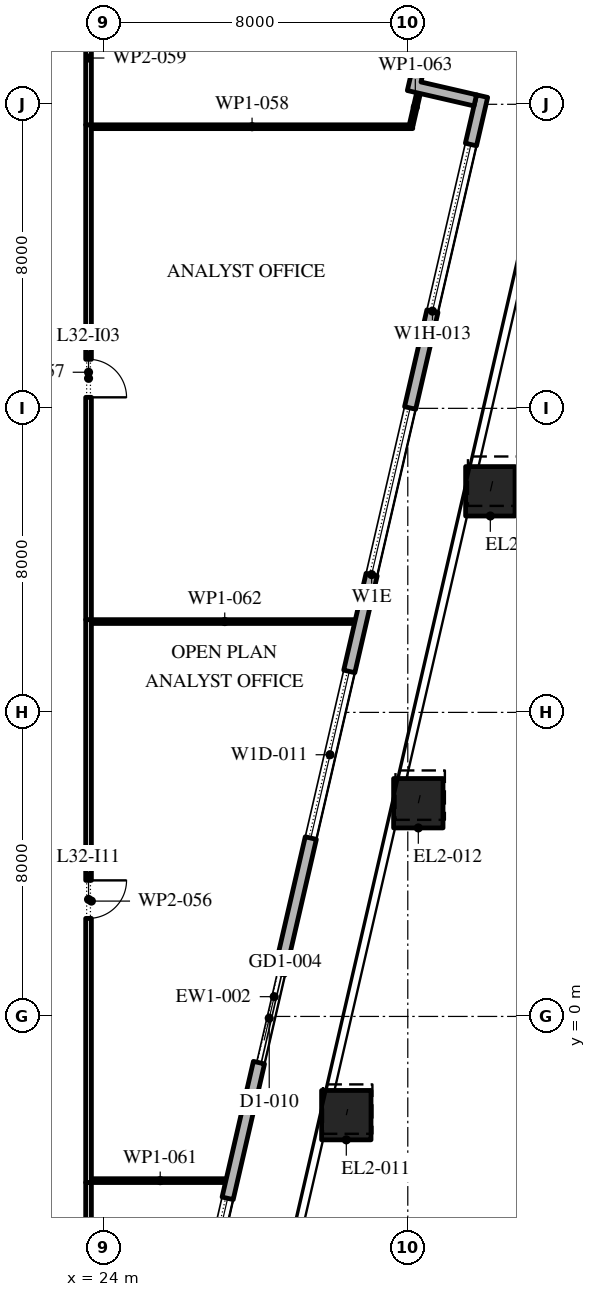
"""IFC4 building model, lengths in metres.
Left out: names, types, materials, properties, quantities, classifications, styles, units other than length and angle.
Written with IfcOpenShell. Run it as: python <this file> out.ifc"""

import sys

from ifc_helpers import new_model, si_unit, direction, frame, frame_2d, origin, origin_2d, place, context, subcontext, project, spatial, polyline, rectangle, outline, extrude, element, fill, save


model = new_model("IFC4")
c1 = context("Model", 3, precision=1e-05, world=origin(), true_north=direction((0.0, 1.0)))
c2 = subcontext(c1, "Body", "Model", "MODEL_VIEW")
j1 = project(units=[si_unit("LENGTHUNIT", "METRE"), si_unit("PLANEANGLEUNIT", "RADIAN")], contexts=[c1])
p1 = place(None, origin())
s1 = spatial("IfcSite", under=j1, at=p1, CompositionType="ELEMENT")
p2 = place(p1, origin())
s2 = spatial("IfcBuilding", under=s1, at=p2, CompositionType="ELEMENT")
p3 = place(p2, frame((0.0, 0.0, 147.6)))
s3 = spatial("IfcBuildingStorey", under=s2, at=p3, CompositionType="ELEMENT", Elevation=147.6)
p4 = place(p3, frame((30.382, -2.597, 0.0), z_axis=(0.008770884695, 0.037929719907, 0.99924191662), x_axis=(-0.974290512438, 0.225295355862, 0.0)))
e1 = element("IfcColumn", 1, at=p4, inside=s3, PredefinedType="COLUMN", context=c2, shape_type="SweptSolid", body=[
    extrude(rectangle(XDim=1.3, YDim=1.3, at=origin_2d()), origin(), (0.0, 0.0, 1.0), 4.203),
])
p5 = place(p3, frame((32.277, 5.61, 0.0), z_axis=(0.011668267153, 0.050562490995, 0.998652735462), x_axis=(-0.974391195695, 0.224859506699, 0.0)))
e2 = element("IfcColumn", 2, at=p5, inside=s3, PredefinedType="COLUMN", context=c2, shape_type="SweptSolid", body=[
    extrude(rectangle(XDim=1.3, YDim=1.3, at=origin_2d()), origin(), (0.0, 0.0, 1.0), 4.206),
])
p6 = place(p3, frame((34.172, 13.817, 0.0), z_axis=(0.014559788571, 0.063169759976, 0.997896584813), x_axis=(-0.97445148511, 0.224598092528, 0.0)))
e3 = element("IfcColumn", 3, at=p6, inside=s3, PredefinedType="COLUMN", context=c2, shape_type="SweptSolid", body=[
    extrude(rectangle(XDim=1.3, YDim=1.3, at=origin_2d()), origin(), (0.0, 0.0, 1.0), 4.209),
])
p7 = place(p3, origin())
e4 = element("IfcWall", 4, at=p7, inside=s3, PredefinedType="STANDARD", context=c2, shape_type="SweptSolid", body=[
    extrude(outline(polyline([(32.393, 26.116), (30.639, 26.521), (31.111, 28.567), (31.404, 28.5), (30.999, 26.746), (32.753, 26.341), (32.348, 24.587), (33.809, 24.25), (33.742, 23.957), (31.988, 24.362), (32.393, 26.116)])), origin(), (0.0, 0.0, 1.0), 4.0),
])
p8 = place(p3, frame((23.6, -4.37, 0.0), z_axis=(0.0, 0.0, 1.0), x_axis=(0.0, -1.0, 0.0)))
e5 = element("IfcWall", 5, at=p8, inside=s3, PredefinedType="PARTITIONING", context=c2, shape_type="SweptSolid", body=[
    extrude(rectangle(XDim=2.855, YDim=0.15, at=frame_2d((1.427, 0.0))), origin(), (0.0, 0.0, 1.0), 4.0),
])
p9 = place(p3, frame((23.6, 10.44, 0.0), z_axis=(0.0, 0.0, 1.0), x_axis=(0.0, -1.0, 0.0)))
e6 = element("IfcWall", 6, at=p9, inside=s3, PredefinedType="PARTITIONING", context=c2, shape_type="SweptSolid", body=[
    extrude(rectangle(XDim=14.81, YDim=0.15, at=frame_2d((7.405, 0.0))), origin(), (0.0, 0.0, 1.0), 4.0),
])
p10 = place(p9, frame((6.86, 0.0, 0.0)))
e7 = element("IfcOpeningElement", 7, at=p10, cuts=e6, PredefinedType="OPENING", context=c2, shape_type="SweptSolid", body=[
    extrude(rectangle(XDim=1.0, YDim=2.1, at=frame_2d((0.5, 1.05))), frame((0.0, 0.085, 0.0), z_axis=(0.0, -1.0, 0.0), x_axis=(1.0, 0.0, 0.0)), (0.0, 0.0, 1.0), 0.17),
])
p11 = place(p3, frame((23.6, 23.46, 0.0), z_axis=(0.0, 0.0, 1.0), x_axis=(0.0, -1.0, 0.0)))
e8 = element("IfcWall", 8, at=p11, inside=s3, PredefinedType="PARTITIONING", context=c2, shape_type="SweptSolid", body=[
    extrude(rectangle(XDim=13.02, YDim=0.15, at=frame_2d((6.51, 0.0))), origin(), (0.0, 0.0, 1.0), 4.0),
])
p12 = place(p11, frame((6.17, 0.0, 0.0)))
e9 = element("IfcOpeningElement", 9, at=p12, cuts=e8, PredefinedType="OPENING", context=c2, shape_type="SweptSolid", body=[
    extrude(rectangle(XDim=1.0, YDim=2.1, at=frame_2d((0.5, 1.05))), frame((0.0, 0.085, 0.0), z_axis=(0.0, -1.0, 0.0), x_axis=(1.0, 0.0, 0.0)), (0.0, 0.0, 1.0), 0.17),
])
p13 = place(p3, frame((23.675, 23.41, 0.0), z_axis=(0.0, 0.0, 1.0), x_axis=(1.0, 0.0, 0.0)))
e10 = element("IfcWall", 10, at=p13, inside=s3, PredefinedType="PARTITIONING", context=c2, shape_type="SweptSolid", body=[
    extrude(rectangle(XDim=8.455, YDim=0.1, at=frame_2d((4.228, 0.0))), origin(), (0.0, 0.0, 1.0), 4.0),
])
p14 = place(p3, frame((23.6, 26.975, 0.0), z_axis=(0.0, 0.0, 1.0), x_axis=(0.0, -1.0, 0.0)))
e11 = element("IfcWall", 11, at=p14, inside=s3, PredefinedType="PARTITIONING", context=c2, shape_type="SweptSolid", body=[
    extrude(rectangle(XDim=3.515, YDim=0.15, at=frame_2d((1.758, 0.0))), origin(), (0.0, 0.0, 1.0), 4.0),
])
p15 = place(p3, frame((27.296, -4.32, 0.0), z_axis=(0.0, 0.0, 1.0), x_axis=(-1.0, 0.0, 0.0)))
e12 = element("IfcWall", 12, at=p15, inside=s3, PredefinedType="PARTITIONING", context=c2, shape_type="SweptSolid", body=[
    extrude(rectangle(XDim=3.621, YDim=0.1, at=frame_2d((1.811, 0.0))), origin(), (0.0, 0.0, 1.0), 4.0),
])
p16 = place(p3, frame((30.692, 10.39, 0.0), z_axis=(0.0, 0.0, 1.0), x_axis=(-1.0, 0.0, 0.0)))
e13 = element("IfcWall", 13, at=p16, inside=s3, PredefinedType="PARTITIONING", context=c2, shape_type="SweptSolid", body=[
    extrude(rectangle(XDim=7.017, YDim=0.1, at=frame_2d((3.508, 0.0))), origin(), (0.0, 0.0, 1.0), 4.0),
])
p17 = place(p3, frame((32.091, 23.459, 0.0), z_axis=(0.0, 0.0, 1.0), x_axis=(0.223406444343, 0.97472537703, 0.0)))
e14 = element("IfcWall", 14, at=p17, inside=s3, PredefinedType="PARTITIONING", context=c2, shape_type="SweptSolid", body=[
    extrude(rectangle(XDim=0.957, YDim=0.1, at=frame_2d((0.479, 0.0))), origin(), (0.0, 0.0, 1.0), 4.0),
])
p18 = place(p3, frame((23.014, -23.176, 0.0), z_axis=(0.0, 0.0, 1.0), x_axis=(0.2249511548, 0.974370041593, 0.0)))
e15 = element("IfcWall", 15, at=p18, inside=s3, PredefinedType="STANDARD", context=c2, shape_type="SweptSolid", body=[
    extrude(rectangle(XDim=48.638, YDim=0.3, at=frame_2d((24.319, 0.0))), origin(), (0.0, 0.0, 1.0), 4.0),
])
p19 = place(p18, frame((0.295, 0.0, 0.45)))
e16 = element("IfcOpeningElement", 16, at=p19, cuts=e15, PredefinedType="OPENING", context=c2, shape_type="SweptSolid", body=[
    extrude(rectangle(XDim=4.5, YDim=3.05, at=frame_2d((2.25, 1.525))), frame((0.0, 0.16, 0.0), z_axis=(0.0, -1.0, 0.0), x_axis=(1.0, 0.0, 0.0)), (0.0, 0.0, 1.0), 0.32),
])
p20 = place(p18, frame((7.259, 0.0, 0.45)))
e17 = element("IfcOpeningElement", 17, at=p20, cuts=e15, PredefinedType="OPENING", context=c2, shape_type="SweptSolid", body=[
    extrude(rectangle(XDim=4.5, YDim=3.05, at=frame_2d((2.25, 1.525))), frame((0.0, 0.16, 0.0), z_axis=(0.0, -1.0, 0.0), x_axis=(1.0, 0.0, 0.0)), (0.0, 0.0, 1.0), 0.32),
])
p21 = place(p18, frame((14.374, 0.0, 0.45)))
e18 = element("IfcOpeningElement", 18, at=p21, cuts=e15, PredefinedType="OPENING", context=c2, shape_type="SweptSolid", body=[
    extrude(rectangle(XDim=4.5, YDim=3.05, at=frame_2d((2.25, 1.525))), frame((0.0, 0.16, 0.0), z_axis=(0.0, -1.0, 0.0), x_axis=(1.0, 0.0, 0.0)), (0.0, 0.0, 1.0), 0.32),
])
p22 = place(p18, frame((22.538, 0.0, 0.0)))
e19 = element("IfcOpeningElement", 19, at=p22, cuts=e15, PredefinedType="OPENING", context=c2, shape_type="SweptSolid", body=[
    extrude(rectangle(XDim=2.4, YDim=3.5, at=frame_2d((1.2, 1.75))), frame((0.0, 0.16, 0.0), z_axis=(0.0, -1.0, 0.0), x_axis=(1.0, 0.0, 0.0)), (0.0, 0.0, 1.0), 0.32),
])
p23 = place(p18, frame((28.602, 0.0, 0.45)))
e20 = element("IfcOpeningElement", 20, at=p23, cuts=e15, PredefinedType="OPENING", context=c2, shape_type="SweptSolid", body=[
    extrude(rectangle(XDim=4.5, YDim=2.875, at=frame_2d((2.25, 1.438))), frame((0.0, 0.16, 0.0), z_axis=(0.0, -1.0, 0.0), x_axis=(1.0, 0.0, 0.0)), (0.0, 0.0, 1.0), 0.32),
])
p24 = place(p18, frame((35.716, 0.0, 0.45)))
e21 = element("IfcOpeningElement", 21, at=p24, cuts=e15, PredefinedType="OPENING", context=c2, shape_type="SweptSolid", body=[
    extrude(rectangle(XDim=4.5, YDim=2.825, at=frame_2d((2.25, 1.413))), frame((0.0, 0.16, 0.0), z_axis=(0.0, -1.0, 0.0), x_axis=(1.0, 0.0, 0.0)), (0.0, 0.0, 1.0), 0.32),
])
p25 = place(p18, frame((42.831, 0.0, 0.45)))
e22 = element("IfcOpeningElement", 22, at=p25, cuts=e15, PredefinedType="OPENING", context=c2, shape_type="SweptSolid", body=[
    extrude(rectangle(XDim=4.5, YDim=2.75, at=frame_2d((2.25, 1.375))), frame((0.0, 0.16, 0.0), z_axis=(0.0, -1.0, 0.0), x_axis=(1.0, 0.0, 0.0)), (0.0, 0.0, 1.0), 0.32),
])
p26 = place(p21, origin())
e23 = element("IfcWindow", 23, at=p26, inside=s3, PartitioningType="DOUBLE_PANEL_VERTICAL", PredefinedType="WINDOW", context=c2, shape_type="SweptSolid", body=[
    extrude(rectangle(XDim=4.5, YDim=3.05, at=frame_2d((2.25, 1.525))), frame((0.0, 0.03, 0.0), z_axis=(0.0, -1.0, 0.0), x_axis=(1.0, 0.0, 0.0)), (0.0, 0.0, 1.0), 0.06),
])
fill(e18, e23)
p27 = place(p22, origin())
e24 = element("IfcDoor", 24, at=p27, inside=s3, OperationType="DOUBLE_DOOR_SLIDING", PredefinedType="DOOR", context=c2, shape_type="SweptSolid", body=[
    extrude(rectangle(XDim=2.4, YDim=3.5, at=frame_2d((1.2, 1.75))), frame((0.0, 0.025, 0.0), z_axis=(0.0, -1.0, 0.0), x_axis=(1.0, 0.0, 0.0)), (0.0, 0.0, 1.0), 0.05),
])
fill(e19, e24)
p28 = place(p23, origin())
e25 = element("IfcWindow", 25, at=p28, inside=s3, PartitioningType="DOUBLE_PANEL_VERTICAL", PredefinedType="WINDOW", context=c2, shape_type="SweptSolid", body=[
    extrude(rectangle(XDim=4.5, YDim=2.875, at=frame_2d((2.25, 1.438))), frame((0.0, 0.03, 0.0), z_axis=(0.0, -1.0, 0.0), x_axis=(1.0, 0.0, 0.0)), (0.0, 0.0, 1.0), 0.06),
])
fill(e20, e25)
p29 = place(p24, origin())
e26 = element("IfcWindow", 26, at=p29, inside=s3, PartitioningType="DOUBLE_PANEL_VERTICAL", PredefinedType="WINDOW", context=c2, shape_type="SweptSolid", body=[
    extrude(rectangle(XDim=4.5, YDim=2.825, at=frame_2d((2.25, 1.413))), frame((0.0, 0.03, 0.0), z_axis=(0.0, -1.0, 0.0), x_axis=(1.0, 0.0, 0.0)), (0.0, 0.0, 1.0), 0.06),
])
fill(e21, e26)
p30 = place(p25, origin())
e27 = element("IfcWindow", 27, at=p30, inside=s3, PartitioningType="DOUBLE_PANEL_VERTICAL", PredefinedType="WINDOW", context=c2, shape_type="SweptSolid", body=[
    extrude(rectangle(XDim=4.5, YDim=2.75, at=frame_2d((2.25, 1.375))), frame((0.0, 0.03, 0.0), z_axis=(0.0, -1.0, 0.0), x_axis=(1.0, 0.0, 0.0)), (0.0, 0.0, 1.0), 0.06),
])
fill(e22, e27)
p31 = place(p12, origin())
e28 = element("IfcDoor", 28, at=p31, inside=s3, OperationType="SINGLE_SWING_LEFT", PredefinedType="DOOR", context=c2, shape_type="SweptSolid", body=[
    extrude(rectangle(XDim=1.0, YDim=2.1, at=frame_2d((0.5, 1.05))), frame((0.0, 0.025, 0.0), z_axis=(0.0, -1.0, 0.0), x_axis=(1.0, 0.0, 0.0)), (0.0, 0.0, 1.0), 0.05),
])
fill(e9, e28)
p32 = place(p10, origin())
e29 = element("IfcDoor", 29, at=p32, inside=s3, OperationType="SINGLE_SWING_RIGHT", PredefinedType="DOOR", context=c2, shape_type="SweptSolid", body=[
    extrude(rectangle(XDim=1.0, YDim=2.1, at=frame_2d((0.5, 1.05))), frame((0.0, 0.025, 0.0), z_axis=(0.0, -1.0, 0.0), x_axis=(1.0, 0.0, 0.0)), (0.0, 0.0, 1.0), 0.05),
])
fill(e7, e29)
save(model, sys.argv[1])
